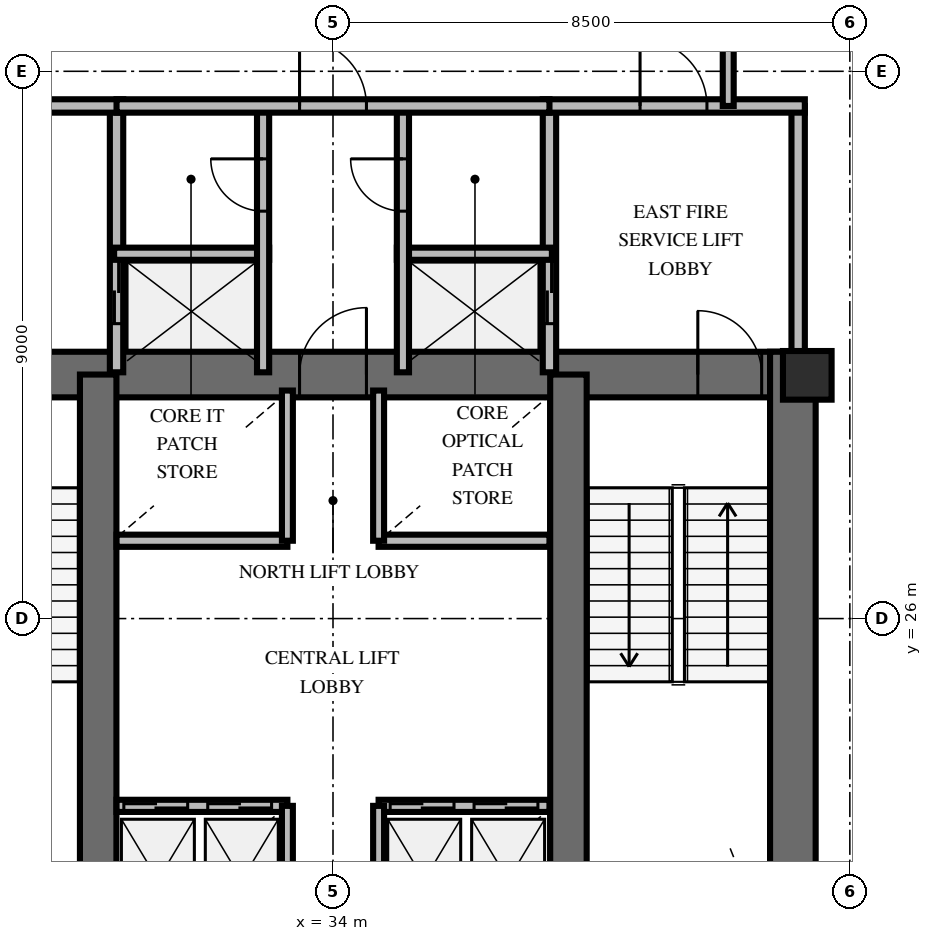
"""IFC4 building model, lengths in metres.
Left out: names, types, materials, properties, quantities, classifications, styles, units other than length and angle.
Written with IfcOpenShell. Run it as: python <this file> out.ifc"""

import sys

from ifc_helpers import new_model, si_unit, direction, frame, frame_2d, origin, origin_2d, place, context, subcontext, project, spatial, rectangle, extrude, element, fill, save


model = new_model("IFC4")
c1 = context("Model", 3, precision=1e-05, world=origin(), true_north=direction((0.0, 1.0)))
c2 = subcontext(c1, "Body", "Model", "MODEL_VIEW")
j1 = project(units=[si_unit("LENGTHUNIT", "METRE"), si_unit("PLANEANGLEUNIT", "RADIAN")], contexts=[c1])
p1 = place(None, origin())
s1 = spatial("IfcSite", under=j1, at=p1, CompositionType="ELEMENT")
p2 = place(p1, origin())
s2 = spatial("IfcBuilding", under=s1, at=p2, CompositionType="ELEMENT")
p3 = place(p2, frame((0.0, 0.0, 129.8)))
s3 = spatial("IfcBuildingStorey", under=s2, at=p3, CompositionType="ELEMENT", Elevation=129.8)
p4 = place(p3, frame((26.072, 30.013, 0.0), z_axis=(0.0, 0.0, 1.0), x_axis=(1.0, 0.0, 0.0)))
e1 = element("IfcWall", 1, at=p4, inside=s3, PredefinedType="SHEAR", context=c2, shape_type="SweptSolid", body=[
    extrude(rectangle(XDim=15.866, YDim=0.75, at=frame_2d((7.933, 0.0))), origin(), (0.0, 0.0, 1.0), 4.0),
])
p5 = place(p4, frame((0.878, 0.0, 0.0)))
e2 = element("IfcOpeningElement", 2, at=p5, cuts=e1, PredefinedType="OPENING", context=c2, shape_type="SweptSolid", body=[
    extrude(rectangle(XDim=1.05, YDim=2.15, at=frame_2d((0.525, 1.075))), frame((0.0, 0.385, 0.0), z_axis=(0.0, -1.0, 0.0), x_axis=(1.0, 0.0, 0.0)), (0.0, 0.0, 1.0), 0.77),
])
p6 = place(p4, frame((13.928, 0.0, 0.0)))
e3 = element("IfcOpeningElement", 3, at=p6, cuts=e1, PredefinedType="OPENING", context=c2, shape_type="SweptSolid", body=[
    extrude(rectangle(XDim=1.05, YDim=2.15, at=frame_2d((0.525, 1.075))), frame((0.0, 0.385, 0.0), z_axis=(0.0, -1.0, 0.0), x_axis=(1.0, 0.0, 0.0)), (0.0, 0.0, 1.0), 0.77),
])
p7 = place(p4, frame((7.378, 0.0, 0.0)))
e4 = element("IfcOpeningElement", 4, at=p7, cuts=e1, PredefinedType="OPENING", context=c2, shape_type="SweptSolid", body=[
    extrude(rectangle(XDim=1.1, YDim=2.15, at=frame_2d((0.55, 1.075))), frame((0.0, 0.385, 0.0), z_axis=(0.0, -1.0, 0.0), x_axis=(1.0, 0.0, 0.0)), (0.0, 0.0, 1.0), 0.77),
])
p8 = place(p3, frame((41.563, 19.812, 0.0), z_axis=(0.0, 0.0, 1.0), x_axis=(0.0, 1.0, 0.0)))
e5 = element("IfcWall", 5, at=p8, inside=s3, PredefinedType="SHEAR", context=c2, shape_type="SweptSolid", body=[
    extrude(rectangle(XDim=10.576, YDim=0.75, at=frame_2d((5.288, 0.0))), origin(), (0.0, 0.0, 1.0), 4.0),
])
for number, where, z_axis, x_axis in (
    (6, (30.138, 20.187, 0.0), (0.0, 0.0, 1.0), (0.0, 1.0, 0.0)),
    (7, (37.872, 20.187, 0.0), (0.0, 0.0, 1.0), (0.0, 1.0, 0.0)),
):
    element("IfcWall", number, at=place(p3, frame(where, z_axis=z_axis, x_axis=x_axis)), inside=s3, PredefinedType="SHEAR", context=c2, shape_type="SweptSolid", body=[
        extrude(rectangle(XDim=9.826, YDim=0.6, at=frame_2d((4.913, 0.0))), origin(), (0.0, 0.0, 1.0), 4.0),
    ])
p9 = place(p3, frame((41.8, 30.0, 0.0), z_axis=(0.0, 0.0, 1.0), x_axis=(1.0, 0.0, 0.0)))
e8 = element("IfcColumn", 8, at=p9, inside=s3, PredefinedType="PILASTER", context=c2, shape_type="SweptSolid", body=[
    extrude(rectangle(XDim=0.8, YDim=0.8, at=origin_2d()), origin(), (0.0, 0.0, 1.0), 4.0),
])
p10 = place(p3, frame((30.44, 30.05, 0.0), z_axis=(0.0, 0.0, 1.0), x_axis=(0.0, 1.0, 0.0)))
e9 = element("IfcWall", 9, at=p10, inside=s3, PredefinedType="SOLIDWALL", context=c2, shape_type="SweptSolid", body=[
    extrude(rectangle(XDim=4.38, YDim=0.22, at=frame_2d((2.19, 0.0))), origin(), (0.0, 0.0, 1.0), 2.8),
])
p11 = place(p10, frame((0.8, 0.0, 0.0)))
e10 = element("IfcOpeningElement", 10, at=p11, cuts=e9, PredefinedType="OPENING", context=c2, shape_type="SweptSolid", body=[
    extrude(rectangle(XDim=1.05, YDim=2.1, at=frame_2d((0.525, 1.05))), frame((0.0, 0.12, 0.0), z_axis=(0.0, -1.0, 0.0), x_axis=(1.0, 0.0, 0.0)), (0.0, 0.0, 1.0), 0.24),
])
p12 = place(p3, frame((26.24, 34.43, 0.0), z_axis=(0.0, 0.0, 1.0), x_axis=(1.0, 0.0, 0.0)))
e11 = element("IfcWall", 11, at=p12, inside=s3, PredefinedType="SOLIDWALL", context=c2, shape_type="SweptSolid", body=[
    extrude(rectangle(XDim=4.31, YDim=0.22, at=frame_2d((2.155, 0.0))), origin(), (0.0, 0.0, 1.0), 2.8),
])
p13 = place(p12, frame((1.6, 0.0, 0.0)))
e12 = element("IfcOpeningElement", 12, at=p13, cuts=e11, PredefinedType="OPENING", context=c2, shape_type="SweptSolid", body=[
    extrude(rectangle(XDim=1.1, YDim=2.15, at=frame_2d((0.55, 1.075))), frame((0.0, 0.12, 0.0), z_axis=(0.0, -1.0, 0.0), x_axis=(1.0, 0.0, 0.0)), (0.0, 0.0, 1.0), 0.24),
])
p14 = place(p3, frame((30.4, 32.0, 0.0), z_axis=(0.0, 0.0, 1.0), x_axis=(1.0, 0.0, 0.0)))
e13 = element("IfcWall", 13, at=p14, inside=s3, PredefinedType="SOLIDWALL", context=c2, shape_type="SweptSolid", body=[
    extrude(rectangle(XDim=2.55, YDim=0.2, at=frame_2d((1.275, 0.0))), origin(), (0.0, 0.0, 1.0), 2.8),
])
p15 = place(p3, frame((32.85, 30.05, 0.0), z_axis=(0.0, 0.0, 1.0), x_axis=(0.0, 1.0, 0.0)))
e14 = element("IfcWall", 14, at=p15, inside=s3, PredefinedType="SOLIDWALL", context=c2, shape_type="SweptSolid", body=[
    extrude(rectangle(XDim=4.38, YDim=0.2, at=frame_2d((2.19, 0.0))), origin(), (0.0, 0.0, 1.0), 2.8),
])
p16 = place(p15, frame((2.65, 0.0, 0.0)))
e15 = element("IfcOpeningElement", 15, at=p16, cuts=e14, PredefinedType="OPENING", context=c2, shape_type="SweptSolid", body=[
    extrude(rectangle(XDim=0.86, YDim=2.05, at=frame_2d((0.43, 1.025))), frame((0.0, 0.11, 0.0), z_axis=(0.0, -1.0, 0.0), x_axis=(1.0, 0.0, 0.0)), (0.0, 0.0, 1.0), 0.22),
])
p17 = place(p3, frame((37.56, 30.05, 0.0), z_axis=(0.0, 0.0, 1.0), x_axis=(0.0, 1.0, 0.0)))
e16 = element("IfcWall", 16, at=p17, inside=s3, PredefinedType="SOLIDWALL", context=c2, shape_type="SweptSolid", body=[
    extrude(rectangle(XDim=4.38, YDim=0.22, at=frame_2d((2.19, 0.0))), origin(), (0.0, 0.0, 1.0), 2.8),
])
p18 = place(p17, frame((0.8, 0.0, 0.0)))
e17 = element("IfcOpeningElement", 17, at=p18, cuts=e16, PredefinedType="OPENING", context=c2, shape_type="SweptSolid", body=[
    extrude(rectangle(XDim=1.05, YDim=2.1, at=frame_2d((0.525, 1.05))), frame((0.0, 0.12, 0.0), z_axis=(0.0, -1.0, 0.0), x_axis=(1.0, 0.0, 0.0)), (0.0, 0.0, 1.0), 0.24),
])
p19 = place(p3, frame((41.65, 30.05, 0.0), z_axis=(0.0, 0.0, 1.0), x_axis=(0.0, 1.0, 0.0)))
e18 = element("IfcWall", 18, at=p19, inside=s3, PredefinedType="SOLIDWALL", context=c2, shape_type="SweptSolid", body=[
    extrude(rectangle(XDim=4.38, YDim=0.22, at=frame_2d((2.19, 0.0))), origin(), (0.0, 0.0, 1.0), 2.8),
])
p20 = place(p3, frame((37.45, 34.43, 0.0), z_axis=(0.0, 0.0, 1.0), x_axis=(1.0, 0.0, 0.0)))
e19 = element("IfcWall", 19, at=p20, inside=s3, PredefinedType="SOLIDWALL", context=c2, shape_type="SweptSolid", body=[
    extrude(rectangle(XDim=4.31, YDim=0.22, at=frame_2d((2.155, 0.0))), origin(), (0.0, 0.0, 1.0), 2.8),
])
p21 = place(p20, frame((1.6, 0.0, 0.0)))
e20 = element("IfcOpeningElement", 20, at=p21, cuts=e19, PredefinedType="OPENING", context=c2, shape_type="SweptSolid", body=[
    extrude(rectangle(XDim=1.1, YDim=2.15, at=frame_2d((0.55, 1.075))), frame((0.0, 0.12, 0.0), z_axis=(0.0, -1.0, 0.0), x_axis=(1.0, 0.0, 0.0)), (0.0, 0.0, 1.0), 0.24),
])
p22 = place(p3, frame((35.05, 32.0, 0.0), z_axis=(0.0, 0.0, 1.0), x_axis=(1.0, 0.0, 0.0)))
e21 = element("IfcWall", 21, at=p22, inside=s3, PredefinedType="SOLIDWALL", context=c2, shape_type="SweptSolid", body=[
    extrude(rectangle(XDim=2.55, YDim=0.2, at=frame_2d((1.275, 0.0))), origin(), (0.0, 0.0, 1.0), 2.8),
])
p23 = place(p3, frame((35.15, 30.05, 0.0), z_axis=(0.0, 0.0, 1.0), x_axis=(0.0, 1.0, 0.0)))
e22 = element("IfcWall", 22, at=p23, inside=s3, PredefinedType="SOLIDWALL", context=c2, shape_type="SweptSolid", body=[
    extrude(rectangle(XDim=4.38, YDim=0.2, at=frame_2d((2.19, 0.0))), origin(), (0.0, 0.0, 1.0), 2.8),
])
p24 = place(p23, frame((2.65, 0.0, 0.0)))
e23 = element("IfcOpeningElement", 23, at=p24, cuts=e22, PredefinedType="OPENING", context=c2, shape_type="SweptSolid", body=[
    extrude(rectangle(XDim=0.86, YDim=2.05, at=frame_2d((0.43, 1.025))), frame((0.0, 0.11, 0.0), z_axis=(0.0, -1.0, 0.0), x_axis=(1.0, 0.0, 0.0)), (0.0, 0.0, 1.0), 0.22),
])
p25 = place(p3, frame((30.44, 34.43, 0.0), z_axis=(0.0, 0.0, 1.0), x_axis=(1.0, 0.0, 0.0)))
e24 = element("IfcWall", 24, at=p25, inside=s3, PredefinedType="SOLIDWALL", context=c2, shape_type="SweptSolid", body=[
    extrude(rectangle(XDim=7.12, YDim=0.22, at=frame_2d((3.56, 0.0))), origin(), (0.0, 0.0, 1.0), 2.8),
])
p26 = place(p25, frame((3.01, 0.0, 0.0)))
e25 = element("IfcOpeningElement", 25, at=p26, cuts=e24, PredefinedType="OPENING", context=c2, shape_type="SweptSolid", body=[
    extrude(rectangle(XDim=1.1, YDim=2.15, at=frame_2d((0.55, 1.075))), frame((0.0, 0.12, 0.0), z_axis=(0.0, -1.0, 0.0), x_axis=(1.0, 0.0, 0.0)), (0.0, 0.0, 1.0), 0.24),
])
p27 = place(p3, frame((30.44, 22.92, 0.0), z_axis=(0.0, 0.0, 1.0), x_axis=(1.0, 0.0, 0.0)))
e26 = element("IfcWall", 26, at=p27, inside=s3, PredefinedType="SOLIDWALL", context=c2, shape_type="SweptSolid", body=[
    extrude(rectangle(XDim=2.81, YDim=0.2, at=frame_2d((1.405, 0.0))), origin(), (0.0, 0.0, 1.0), 2.8),
])
p28 = place(p27, frame((0.12, 0.0, 0.0)))
e27 = element("IfcOpeningElement", 27, at=p28, cuts=e26, PredefinedType="OPENING", context=c2, shape_type="SweptSolid", body=[
    extrude(rectangle(XDim=1.05, YDim=2.1, at=frame_2d((0.525, 1.05))), frame((0.0, 0.11, 0.0), z_axis=(0.0, -1.0, 0.0), x_axis=(1.0, 0.0, 0.0)), (0.0, 0.0, 1.0), 0.22),
])
p29 = place(p27, frame((1.5, 0.0, 0.0)))
e28 = element("IfcOpeningElement", 28, at=p29, cuts=e26, PredefinedType="OPENING", context=c2, shape_type="SweptSolid", body=[
    extrude(rectangle(XDim=1.05, YDim=2.1, at=frame_2d((0.525, 1.05))), frame((0.0, 0.11, 0.0), z_axis=(0.0, -1.0, 0.0), x_axis=(1.0, 0.0, 0.0)), (0.0, 0.0, 1.0), 0.22),
])
p30 = place(p3, frame((33.25, 20.5, 0.0), z_axis=(0.0, 0.0, 1.0), x_axis=(0.0, 1.0, 0.0)))
e29 = element("IfcWall", 29, at=p30, inside=s3, PredefinedType="SOLIDWALL", context=c2, shape_type="SweptSolid", body=[
    extrude(rectangle(XDim=2.42, YDim=0.18, at=frame_2d((1.21, 0.0))), origin(), (0.0, 0.0, 1.0), 2.8),
])
p31 = place(p3, frame((34.75, 22.92, 0.0), z_axis=(0.0, 0.0, 1.0), x_axis=(1.0, 0.0, 0.0)))
e30 = element("IfcWall", 30, at=p31, inside=s3, PredefinedType="SOLIDWALL", context=c2, shape_type="SweptSolid", body=[
    extrude(rectangle(XDim=2.81, YDim=0.2, at=frame_2d((1.405, 0.0))), origin(), (0.0, 0.0, 1.0), 2.8),
])
p32 = place(p31, frame((0.19, 0.0, 0.0)))
e31 = element("IfcOpeningElement", 31, at=p32, cuts=e30, PredefinedType="OPENING", context=c2, shape_type="SweptSolid", body=[
    extrude(rectangle(XDim=1.05, YDim=2.1, at=frame_2d((0.525, 1.05))), frame((0.0, 0.11, 0.0), z_axis=(0.0, -1.0, 0.0), x_axis=(1.0, 0.0, 0.0)), (0.0, 0.0, 1.0), 0.22),
])
p33 = place(p31, frame((1.57, 0.0, 0.0)))
e32 = element("IfcOpeningElement", 32, at=p33, cuts=e30, PredefinedType="OPENING", context=c2, shape_type="SweptSolid", body=[
    extrude(rectangle(XDim=1.05, YDim=2.1, at=frame_2d((0.525, 1.05))), frame((0.0, 0.11, 0.0), z_axis=(0.0, -1.0, 0.0), x_axis=(1.0, 0.0, 0.0)), (0.0, 0.0, 1.0), 0.22),
])
p34 = place(p3, frame((34.75, 20.5, 0.0), z_axis=(0.0, 0.0, 1.0), x_axis=(0.0, 1.0, 0.0)))
e33 = element("IfcWall", 33, at=p34, inside=s3, PredefinedType="SOLIDWALL", context=c2, shape_type="SweptSolid", body=[
    extrude(rectangle(XDim=2.42, YDim=0.18, at=frame_2d((1.21, 0.0))), origin(), (0.0, 0.0, 1.0), 2.8),
])
p35 = place(p3, frame((30.44, 27.28, 0.0), z_axis=(0.0, 0.0, 1.0), x_axis=(1.0, 0.0, 0.0)))
e34 = element("IfcWall", 34, at=p35, inside=s3, PredefinedType="SOLIDWALL", context=c2, shape_type="SweptSolid", body=[
    extrude(rectangle(XDim=2.81, YDim=0.2, at=frame_2d((1.405, 0.0))), origin(), (0.0, 0.0, 1.0), 2.8),
])
p36 = place(p3, frame((33.25, 27.28, 0.0), z_axis=(0.0, 0.0, 1.0), x_axis=(0.0, 1.0, 0.0)))
e35 = element("IfcWall", 35, at=p36, inside=s3, PredefinedType="SOLIDWALL", context=c2, shape_type="SweptSolid", body=[
    extrude(rectangle(XDim=2.47, YDim=0.18, at=frame_2d((1.235, 0.0))), origin(), (0.0, 0.0, 1.0), 2.8),
])
p37 = place(p3, frame((34.75, 27.28, 0.0), z_axis=(0.0, 0.0, 1.0), x_axis=(1.0, 0.0, 0.0)))
e36 = element("IfcWall", 36, at=p37, inside=s3, PredefinedType="SOLIDWALL", context=c2, shape_type="SweptSolid", body=[
    extrude(rectangle(XDim=2.81, YDim=0.2, at=frame_2d((1.405, 0.0))), origin(), (0.0, 0.0, 1.0), 2.8),
])
p38 = place(p3, frame((34.75, 27.28, 0.0), z_axis=(0.0, 0.0, 1.0), x_axis=(0.0, 1.0, 0.0)))
e37 = element("IfcWall", 37, at=p38, inside=s3, PredefinedType="SOLIDWALL", context=c2, shape_type="SweptSolid", body=[
    extrude(rectangle(XDim=2.47, YDim=0.18, at=frame_2d((1.235, 0.0))), origin(), (0.0, 0.0, 1.0), 2.8),
])
p39 = place(p3, frame((40.5, 36.123, 0.0), z_axis=(0.0, 0.0, 1.0), x_axis=(0.0, -1.0, 0.0)))
e38 = element("IfcWall", 38, at=p39, inside=s3, PredefinedType="PARTITIONING", context=c2, shape_type="SweptSolid", body=[
    extrude(rectangle(XDim=1.693, YDim=0.18, at=frame_2d((0.846, 0.0))), origin(), (0.0, 0.0, 1.0), 2.8),
])
p40 = place(p6, origin())
e39 = element("IfcDoor", 39, at=p40, inside=s3, OperationType="SINGLE_SWING_LEFT", PredefinedType="DOOR", context=c2, shape_type="SweptSolid", body=[
    extrude(rectangle(XDim=1.05, YDim=2.15, at=frame_2d((0.525, 1.075))), frame((0.0, 0.025, 0.0), z_axis=(0.0, -1.0, 0.0), x_axis=(1.0, 0.0, 0.0)), (0.0, 0.0, 1.0), 0.05),
])
fill(e3, e39)
p41 = place(p7, origin())
e40 = element("IfcDoor", 40, at=p41, inside=s3, OperationType="SINGLE_SWING_RIGHT", PredefinedType="DOOR", context=c2, shape_type="SweptSolid", body=[
    extrude(rectangle(XDim=1.1, YDim=2.15, at=frame_2d((0.55, 1.075))), frame((0.0, 0.025, 0.0), z_axis=(0.0, -1.0, 0.0), x_axis=(1.0, 0.0, 0.0)), (0.0, 0.0, 1.0), 0.05),
])
fill(e4, e40)
p42 = place(p11, origin())
e41 = element("IfcDoor", 41, at=p42, inside=s3, OperationType="DOUBLE_DOOR_SLIDING", PredefinedType="USERDEFINED", context=c2, shape_type="SweptSolid", body=[
    extrude(rectangle(XDim=1.05, YDim=2.1, at=frame_2d((0.525, 1.05))), frame((0.0, 0.025, 0.0), z_axis=(0.0, -1.0, 0.0), x_axis=(1.0, 0.0, 0.0)), (0.0, 0.0, 1.0), 0.05),
])
fill(e10, e41)
p43 = place(p16, origin())
e42 = element("IfcDoor", 42, at=p43, inside=s3, OperationType="SINGLE_SWING_RIGHT", PredefinedType="TRAPDOOR", context=c2, shape_type="SweptSolid", body=[
    extrude(rectangle(XDim=0.86, YDim=2.05, at=frame_2d((0.43, 1.025))), frame((0.0, 0.025, 0.0), z_axis=(0.0, -1.0, 0.0), x_axis=(1.0, 0.0, 0.0)), (0.0, 0.0, 1.0), 0.05),
])
fill(e15, e42)
p44 = place(p21, origin())
e43 = element("IfcDoor", 43, at=p44, inside=s3, OperationType="SINGLE_SWING_LEFT", PredefinedType="DOOR", context=c2, shape_type="SweptSolid", body=[
    extrude(rectangle(XDim=1.1, YDim=2.15, at=frame_2d((0.55, 1.075))), frame((0.0, 0.025, 0.0), z_axis=(0.0, -1.0, 0.0), x_axis=(1.0, 0.0, 0.0)), (0.0, 0.0, 1.0), 0.05),
])
fill(e20, e43)
p45 = place(p18, origin())
e44 = element("IfcDoor", 44, at=p45, inside=s3, OperationType="DOUBLE_DOOR_SLIDING", PredefinedType="USERDEFINED", context=c2, shape_type="SweptSolid", body=[
    extrude(rectangle(XDim=1.05, YDim=2.1, at=frame_2d((0.525, 1.05))), frame((0.0, 0.025, 0.0), z_axis=(0.0, -1.0, 0.0), x_axis=(1.0, 0.0, 0.0)), (0.0, 0.0, 1.0), 0.05),
])
fill(e17, e44)
p46 = place(p24, origin())
e45 = element("IfcDoor", 45, at=p46, inside=s3, OperationType="SINGLE_SWING_RIGHT", PredefinedType="TRAPDOOR", context=c2, shape_type="SweptSolid", body=[
    extrude(rectangle(XDim=0.86, YDim=2.05, at=frame_2d((0.43, 1.025))), frame((0.0, 0.025, 0.0), z_axis=(0.0, -1.0, 0.0), x_axis=(1.0, 0.0, 0.0)), (0.0, 0.0, 1.0), 0.05),
])
fill(e23, e45)
p47 = place(p26, origin())
e46 = element("IfcDoor", 46, at=p47, inside=s3, OperationType="SINGLE_SWING_LEFT", PredefinedType="DOOR", context=c2, shape_type="SweptSolid", body=[
    extrude(rectangle(XDim=1.1, YDim=2.15, at=frame_2d((0.55, 1.075))), frame((0.0, 0.025, 0.0), z_axis=(0.0, -1.0, 0.0), x_axis=(1.0, 0.0, 0.0)), (0.0, 0.0, 1.0), 0.05),
])
fill(e25, e46)
p48 = place(p28, origin())
e47 = element("IfcDoor", 47, at=p48, inside=s3, OperationType="DOUBLE_DOOR_SLIDING", PredefinedType="USERDEFINED", context=c2, shape_type="SweptSolid", body=[
    extrude(rectangle(XDim=1.05, YDim=2.1, at=frame_2d((0.525, 1.05))), frame((0.0, 0.025, 0.0), z_axis=(0.0, -1.0, 0.0), x_axis=(1.0, 0.0, 0.0)), (0.0, 0.0, 1.0), 0.05),
])
fill(e27, e47)
p49 = place(p29, origin())
e48 = element("IfcDoor", 48, at=p49, inside=s3, OperationType="DOUBLE_DOOR_SLIDING", PredefinedType="USERDEFINED", context=c2, shape_type="SweptSolid", body=[
    extrude(rectangle(XDim=1.05, YDim=2.1, at=frame_2d((0.525, 1.05))), frame((0.0, 0.025, 0.0), z_axis=(0.0, -1.0, 0.0), x_axis=(1.0, 0.0, 0.0)), (0.0, 0.0, 1.0), 0.05),
])
fill(e28, e48)
p50 = place(p32, origin())
e49 = element("IfcDoor", 49, at=p50, inside=s3, OperationType="DOUBLE_DOOR_SLIDING", PredefinedType="USERDEFINED", context=c2, shape_type="SweptSolid", body=[
    extrude(rectangle(XDim=1.05, YDim=2.1, at=frame_2d((0.525, 1.05))), frame((0.0, 0.025, 0.0), z_axis=(0.0, -1.0, 0.0), x_axis=(1.0, 0.0, 0.0)), (0.0, 0.0, 1.0), 0.05),
])
fill(e31, e49)
p51 = place(p33, origin())
e50 = element("IfcDoor", 50, at=p51, inside=s3, OperationType="DOUBLE_DOOR_SLIDING", PredefinedType="USERDEFINED", context=c2, shape_type="SweptSolid", body=[
    extrude(rectangle(XDim=1.05, YDim=2.1, at=frame_2d((0.525, 1.05))), frame((0.0, 0.025, 0.0), z_axis=(0.0, -1.0, 0.0), x_axis=(1.0, 0.0, 0.0)), (0.0, 0.0, 1.0), 0.05),
])
fill(e32, e50)
save(model, sys.argv[1])
